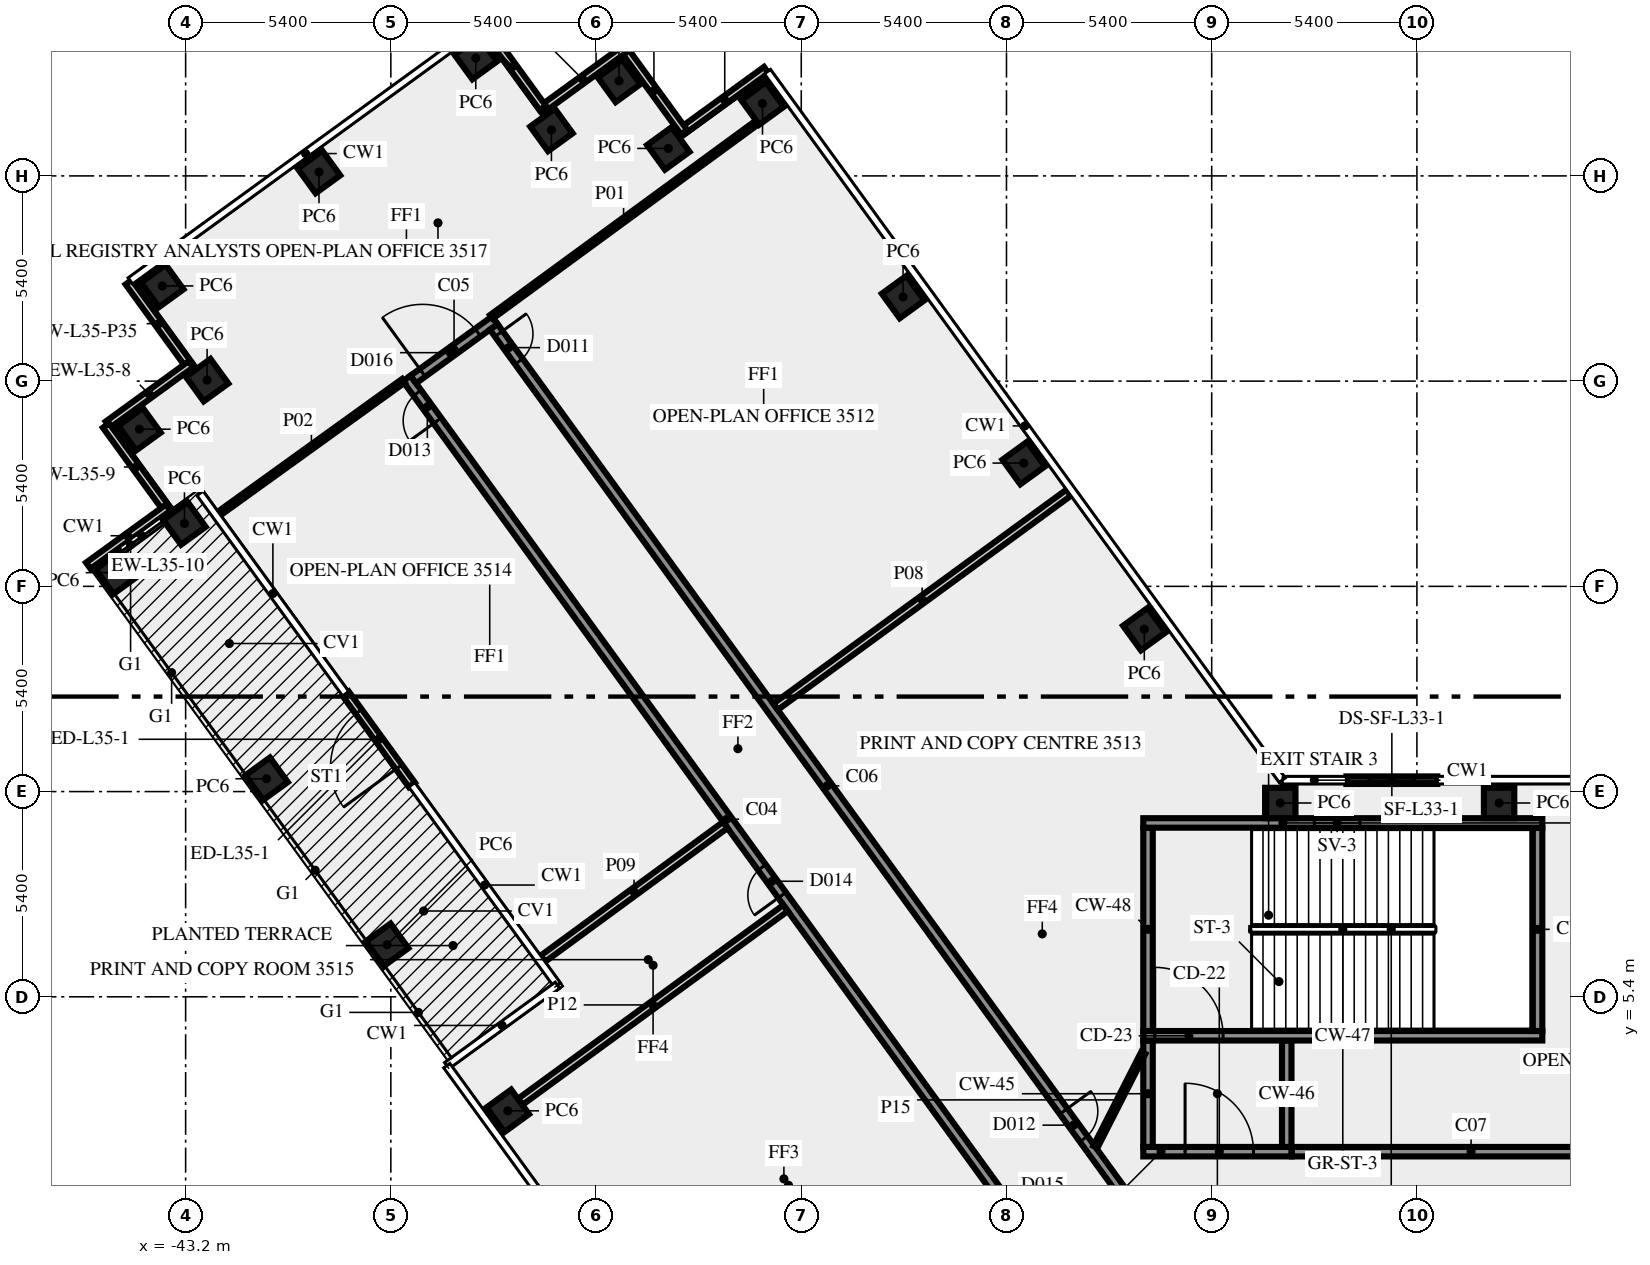
"""IFC4 building model, lengths in metres.
Left out: names, types, materials, properties, quantities, classifications, styles, units other than length and angle.
Written with IfcOpenShell. Run it as: python <this file> out.ifc"""

import sys

from ifc_helpers import new_model, si_unit, direction, frame, frame_2d, origin, origin_2d, place, context, subcontext, project, spatial, rectangle, extrude, element, fill, save


model = new_model("IFC4")
c1 = context("Model", 3, precision=1e-05, world=origin(), true_north=direction((0.0, 1.0)))
c2 = subcontext(c1, "Body", "Model", "MODEL_VIEW")
j1 = project(units=[si_unit("LENGTHUNIT", "METRE"), si_unit("PLANEANGLEUNIT", "RADIAN")], contexts=[c1])
p1 = place(None, origin())
s1 = spatial("IfcSite", under=j1, at=p1, CompositionType="ELEMENT")
p2 = place(p1, origin())
s2 = spatial("IfcBuilding", under=s1, at=p2, CompositionType="ELEMENT")
p3 = place(p2, frame((0.0, 0.0, 152.0)))
s3 = spatial("IfcBuildingStorey", under=s2, at=p3, CompositionType="ELEMENT", Elevation=152.0)
for number, where, z_axis, x_axis in (
    (1, (-17.974, 15.075, 0.0), (0.0, 0.0, 1.0), (-0.588, 0.809, 0.0)),
    (2, (-21.147, 19.444, 0.0), (0.0, 0.0, 1.0), (-0.588, 0.809, 0.0)),
    (3, (-24.321, 23.812, 0.0), (0.0, 0.0, 1.0), (-0.588, 0.809, 0.0)),
    (4, (-28.02, 28.905, 0.0), (0.0, 0.0, 1.0), (-0.809, -0.588, 0.0)),
    (5, (-30.499, 27.723, 0.0), (0.0, 0.0, 1.0), (-0.809, -0.588, 0.0)),
    (6, (-31.795, 29.5, 0.0), (0.0, 0.0, 1.0), (-0.588, 0.809, 0.0)),
    (7, (-33.574, 28.209, 0.0), (0.0, 0.0, 1.0), (-0.588, 0.809, 0.0)),
    (8, (-35.565, 30.1, 0.0), (0.0, 0.0, 1.0), (-0.809, -0.588, 0.0)),
    (9, (-39.691, 27.102, 0.0), (0.0, 0.0, 1.0), (-0.809, -0.588, 0.0)),
    (10, (-43.815, 24.105, 0.0), (0.0, 0.0, 1.0), (-0.809, -0.588, 0.0)),
    (11, (-42.635, 21.626, 0.0), (0.0, 0.0, 1.0), (-0.809, -0.588, 0.0)),
    (12, (-44.415, 20.335, 0.0), (0.0, 0.0, 1.0), (0.588, -0.809, 0.0)),
    (13, (-43.231, 17.854, 0.0), (0.0, 0.0, 1.0), (0.588, -0.809, 0.0)),
    (14, (-45.01, 16.56, 0.0), (0.0, 0.0, 1.0), (0.588, -0.809, 0.0)),
    (15, (-41.07, 11.137, 0.0), (0.0, 0.0, 1.0), (0.588, -0.809, 0.0)),
    (16, (-37.896, 6.769, 0.0), (0.0, 0.0, 1.0), (0.588, -0.809, 0.0)),
    (17, (-34.722, 2.4, 0.0), (0.0, 0.0, 1.0), (0.588, -0.809, 0.0)),
    (18, (-8.637, 10.5, 0.0), (0.0, 0.0, 1.0), (-1.0, 0.0, 0.0)),
    (19, (-14.395, 10.5, 0.0), (0.0, 0.0, 1.0), (-1.0, 0.0, 0.0)),
):
    element("IfcColumn", number, at=place(p3, frame(where, z_axis=z_axis, x_axis=x_axis)), inside=s3, PredefinedType="COLUMN", context=c2, shape_type="SweptSolid", body=[
        extrude(rectangle(XDim=0.8, YDim=0.8, at=origin_2d()), origin(), (0.0, 0.0, 1.0), 3.65),
    ])
p4 = place(p3, frame((-10.263, 11.1, 0.0), z_axis=(0.0, 0.0, 1.0), x_axis=(-1.0, 0.0, 0.0)))
e20 = element("IfcWall", 20, at=p4, inside=s3, PredefinedType="SOLIDWALL", context=c2, shape_type="SweptSolid", body=[
    extrude(rectangle(XDim=2.392, YDim=0.2, at=frame_2d((1.196, 0.0))), origin(), (0.0, 0.0, 1.0), 3.65),
])
p5 = place(p4, frame((0.596, 0.0, 1.0)))
e21 = element("IfcOpeningElement", 21, at=p5, cuts=e20, PredefinedType="OPENING", context=c2, shape_type="SweptSolid", body=[
    extrude(rectangle(XDim=1.2, YDim=1.2, at=frame_2d((0.6, 0.6))), frame((0.0, 0.11, 0.0), z_axis=(0.0, -1.0, 0.0), x_axis=(1.0, 0.0, 0.0)), (0.0, 0.0, 1.0), 0.22),
])
for number, where, z_axis, x_axis in (
    (22, (-27.921, 29.787, 0.0), (0.0, 0.0, 1.0), (-0.809, -0.588, 0.0)),
    (23, (-30.083, 28.149, 0.0), (0.0, 0.0, 1.0), (-0.588, 0.809, 0.0)),
    (24, (-31.654, 30.331, 0.0), (0.0, 0.0, 1.0), (-0.809, -0.588, 0.0)),
    (25, (-33.801, 28.786, 0.0), (0.0, 0.0, 1.0), (-0.588, 0.809, 0.0)),
    (26, (-44.699, 24.205, 0.0), (0.0, 0.0, 1.0), (0.588, -0.809, 0.0)),
):
    element("IfcWall", number, at=place(p3, frame(where, z_axis=z_axis, x_axis=x_axis)), inside=s3, PredefinedType="SOLIDWALL", context=c2, shape_type="SweptSolid", body=[
        extrude(rectangle(XDim=2.7, YDim=0.2, at=frame_2d((1.35, 0.0))), origin(), (0.0, 0.0, 1.0), 3.65),
    ])
p6 = place(p3, frame((-37.246, 10.978, 0.0), z_axis=(0.0, 0.0, 1.0), x_axis=(-0.587735577821, 0.809053082661, 0.0)))
e27 = element("IfcWall", 27, at=p6, inside=s3, PredefinedType="SOLIDWALL", context=c2, shape_type="SweptSolid", body=[
    extrude(rectangle(XDim=2.963, YDim=0.2, at=frame_2d((1.481, 0.0))), origin(), (0.0, 0.0, 1.0), 3.65),
])
p7 = place(p6, frame((0.582, 0.0, 0.0)))
e28 = element("IfcOpeningElement", 28, at=p7, cuts=e27, PredefinedType="OPENING", context=c2, shape_type="SweptSolid", body=[
    extrude(rectangle(XDim=1.8, YDim=2.4, at=frame_2d((0.9, 1.2))), frame((0.0, 0.11, 0.0), z_axis=(0.0, -1.0, 0.0), x_axis=(1.0, 0.0, 0.0)), (0.0, 0.0, 1.0), 0.22),
])
for number, where, z_axis, x_axis in (
    (29, (-43.061, 22.043, 0.0), (0.0, 0.0, 1.0), (-0.809, -0.588, 0.0)),
    (30, (-45.296, 20.434, 0.0), (0.0, 0.0, 1.0), (0.588, -0.809, 0.0)),
):
    element("IfcWall", number, at=place(p3, frame(where, z_axis=z_axis, x_axis=x_axis)), inside=s3, PredefinedType="SOLIDWALL", context=c2, shape_type="SweptSolid", body=[
        extrude(rectangle(XDim=2.7, YDim=0.2, at=frame_2d((1.35, 0.0))), origin(), (0.0, 0.0, 1.0), 3.65),
    ])
p8 = place(p3, frame((-43.658, 18.272, 0.0), z_axis=(0.0, 0.0, 1.0), x_axis=(-0.808979656733, -0.587836639716, 0.0)))
e31 = element("IfcWall", 31, at=p8, inside=s3, PredefinedType="SOLIDWALL", context=c2, shape_type="SweptSolid", body=[
    extrude(rectangle(XDim=2.6, YDim=0.2, at=frame_2d((1.3, 0.0))), origin(), (0.0, 0.0, 1.0), 3.65),
])
p9 = place(p3, frame((-18.0, 1.325, 0.0), z_axis=(0.0, 0.0, 1.0), x_axis=(1.0, 0.0, 0.0)))
e32 = element("IfcWall", 32, at=p9, inside=s3, PredefinedType="SHEAR", context=c2, shape_type="SweptSolid", body=[
    extrude(rectangle(XDim=3.9, YDim=0.25, at=frame_2d((1.95, 0.0))), origin(), (0.0, 0.0, 1.0), 3.65),
])
p10 = place(p9, frame((1.1, 0.0, 0.0)))
e33 = element("IfcOpeningElement", 33, at=p10, cuts=e32, PredefinedType="OPENING", context=c2, shape_type="SweptSolid", body=[
    extrude(rectangle(XDim=1.8, YDim=2.1, at=frame_2d((0.9, 1.05))), frame((0.0, 0.135, 0.0), z_axis=(0.0, -1.0, 0.0), x_axis=(1.0, 0.0, 0.0)), (0.0, 0.0, 1.0), 0.27),
])
for number, where, z_axis, x_axis in (
    (34, (-17.875, 1.45, 0.0), (0.0, 0.0, 1.0), (0.0, 1.0, 0.0)),
    (35, (-14.225, 1.45, 0.0), (0.0, 0.0, 1.0), (0.0, 1.0, 0.0)),
):
    element("IfcWall", number, at=place(p3, frame(where, z_axis=z_axis, x_axis=x_axis)), inside=s3, PredefinedType="SHEAR", context=c2, shape_type="SweptSolid", body=[
        extrude(rectangle(XDim=2.8, YDim=0.25, at=frame_2d((1.4, 0.0))), origin(), (0.0, 0.0, 1.0), 3.65),
    ])
p11 = place(p3, frame((-18.0, 4.375, 0.0), z_axis=(0.0, 0.0, 1.0), x_axis=(1.0, 0.0, 0.0)))
e36 = element("IfcWall", 36, at=p11, inside=s3, PredefinedType="SHEAR", context=c2, shape_type="SweptSolid", body=[
    extrude(rectangle(XDim=10.5, YDim=0.25, at=frame_2d((5.25, 0.0))), origin(), (0.0, 0.0, 1.0), 3.65),
])
p12 = place(p11, frame((0.3, 0.0, 0.0)))
e37 = element("IfcOpeningElement", 37, at=p12, cuts=e36, PredefinedType="OPENING", context=c2, shape_type="SweptSolid", body=[
    extrude(rectangle(XDim=1.8, YDim=2.1, at=frame_2d((0.9, 1.05))), frame((0.0, 0.135, 0.0), z_axis=(0.0, -1.0, 0.0), x_axis=(1.0, 0.0, 0.0)), (0.0, 0.0, 1.0), 0.27),
])
for number, where, z_axis, x_axis in (
    (38, (-17.875, 4.5, 0.0), (0.0, 0.0, 1.0), (0.0, 1.0, 0.0)),
    (39, (-7.625, 4.5, 0.0), (0.0, 0.0, 1.0), (0.0, 1.0, 0.0)),
):
    element("IfcWall", number, at=place(p3, frame(where, z_axis=z_axis, x_axis=x_axis)), inside=s3, PredefinedType="SHEAR", context=c2, shape_type="SweptSolid", body=[
        extrude(rectangle(XDim=5.35, YDim=0.25, at=frame_2d((2.675, 0.0))), origin(), (0.0, 0.0, 1.0), 3.65),
    ])
p13 = place(p3, frame((-18.0, 9.975, 0.0), z_axis=(0.0, 0.0, 1.0), x_axis=(1.0, 0.0, 0.0)))
e40 = element("IfcWall", 40, at=p13, inside=s3, PredefinedType="SHEAR", context=c2, shape_type="SweptSolid", body=[
    extrude(rectangle(XDim=10.5, YDim=0.25, at=frame_2d((5.25, 0.0))), origin(), (0.0, 0.0, 1.0), 3.65),
])
p14 = place(p13, frame((4.5, 0.0, 1.0)))
e41 = element("IfcOpeningElement", 41, at=p14, cuts=e40, PredefinedType="OPENING", context=c2, shape_type="SweptSolid", body=[
    extrude(rectangle(XDim=1.2, YDim=1.2, at=frame_2d((0.6, 0.6))), frame((0.0, 0.135, 0.0), z_axis=(0.0, -1.0, 0.0), x_axis=(1.0, 0.0, 0.0)), (0.0, 0.0, 1.0), 0.27),
])
p15 = place(p3, frame((-20.531, -1.523, 0.0), z_axis=(0.0, 0.0, 1.0), x_axis=(-0.587785812891, 0.809016587076, 0.0)))
e42 = element("IfcWall", 42, at=p15, inside=s3, PredefinedType="SOLIDWALL", context=c2, shape_type="SweptSolid", body=[
    extrude(rectangle(XDim=28.67, YDim=0.25, at=frame_2d((14.335, 0.0))), origin(), (0.0, 0.0, 1.0), 3.65),
])
p16 = place(p15, frame((27.296, 0.0, 0.0)))
e43 = element("IfcOpeningElement", 43, at=p16, cuts=e42, PredefinedType="OPENING", context=c2, shape_type="SweptSolid", body=[
    extrude(rectangle(XDim=0.9, YDim=2.1, at=frame_2d((0.45, 1.05))), frame((0.0, 0.135, 0.0), z_axis=(0.0, -1.0, 0.0), x_axis=(1.0, 0.0, 0.0)), (0.0, 0.0, 1.0), 0.27),
])
p17 = place(p15, frame((11.866, 0.0, 0.0)))
e44 = element("IfcOpeningElement", 44, at=p17, cuts=e42, PredefinedType="OPENING", context=c2, shape_type="SweptSolid", body=[
    extrude(rectangle(XDim=0.9, YDim=2.1, at=frame_2d((0.45, 1.05))), frame((0.0, 0.135, 0.0), z_axis=(0.0, -1.0, 0.0), x_axis=(1.0, 0.0, 0.0)), (0.0, 0.0, 1.0), 0.27),
])
p18 = place(p15, frame((0.533, 0.0, 0.0)))
e45 = element("IfcOpeningElement", 45, at=p18, cuts=e42, PredefinedType="OPENING", context=c2, shape_type="SweptSolid", body=[
    extrude(rectangle(XDim=0.9, YDim=2.1, at=frame_2d((0.45, 1.05))), frame((0.0, 0.135, 0.0), z_axis=(0.0, -1.0, 0.0), x_axis=(1.0, 0.0, 0.0)), (0.0, 0.0, 1.0), 0.27),
])
p19 = place(p3, frame((-37.208, 21.644, 0.0), z_axis=(0.0, 0.0, 1.0), x_axis=(0.809038743598, 0.587755315891, 0.0)))
e46 = element("IfcWall", 46, at=p19, inside=s3, PredefinedType="SOLIDWALL", context=c2, shape_type="SweptSolid", body=[
    extrude(rectangle(XDim=2.65, YDim=0.25, at=frame_2d((1.325, 0.0))), origin(), (0.0, 0.0, 1.0), 3.65),
])
p20 = place(p19, frame((0.3, 0.0, 0.0)))
e47 = element("IfcOpeningElement", 47, at=p20, cuts=e46, PredefinedType="OPENING", context=c2, shape_type="SweptSolid", body=[
    extrude(rectangle(XDim=1.8, YDim=2.1, at=frame_2d((0.9, 1.05))), frame((0.0, 0.135, 0.0), z_axis=(0.0, -1.0, 0.0), x_axis=(1.0, 0.0, 0.0)), (0.0, 0.0, 1.0), 0.27),
])
p21 = place(p3, frame((-35.092, 23.027, 0.0), z_axis=(0.0, 0.0, 1.0), x_axis=(0.587784076945, -0.809017848313, 0.0)))
e48 = element("IfcWall", 48, at=p21, inside=s3, PredefinedType="SOLIDWALL", context=c2, shape_type="SweptSolid", body=[
    extrude(rectangle(XDim=29.853, YDim=0.25, at=frame_2d((14.927, 0.0))), origin(), (0.0, 0.0, 1.0), 3.65),
])
p22 = place(p21, frame((0.224, 0.0, 0.0)))
e49 = element("IfcOpeningElement", 49, at=p22, cuts=e48, PredefinedType="OPENING", context=c2, shape_type="SweptSolid", body=[
    extrude(rectangle(XDim=0.9, YDim=2.1, at=frame_2d((0.45, 1.05))), frame((0.0, 0.135, 0.0), z_axis=(0.0, -1.0, 0.0), x_axis=(1.0, 0.0, 0.0)), (0.0, 0.0, 1.0), 0.27),
])
p23 = place(p21, frame((25.512, 0.0, 0.0)))
e50 = element("IfcOpeningElement", 50, at=p23, cuts=e48, PredefinedType="OPENING", context=c2, shape_type="SweptSolid", body=[
    extrude(rectangle(XDim=0.9, YDim=2.1, at=frame_2d((0.45, 1.05))), frame((0.0, 0.135, 0.0), z_axis=(0.0, -1.0, 0.0), x_axis=(1.0, 0.0, 0.0)), (0.0, 0.0, 1.0), 0.27),
])
p24 = place(p3, frame((-14.09, 1.325, 0.0), z_axis=(0.0, 0.0, 1.0), x_axis=(1.0, 0.0, 0.0)))
e51 = element("IfcWall", 51, at=p24, inside=s3, PredefinedType="SOLIDWALL", context=c2, shape_type="SweptSolid", body=[
    extrude(rectangle(XDim=9.431, YDim=0.25, at=frame_2d((4.716, 0.0))), origin(), (0.0, 0.0, 1.0), 3.65),
])
p25 = place(p24, frame((8.09, 0.0, 0.0)))
e52 = element("IfcOpeningElement", 52, at=p25, cuts=e51, PredefinedType="OPENING", context=c2, shape_type="SweptSolid", body=[
    extrude(rectangle(XDim=0.9, YDim=2.1, at=frame_2d((0.45, 1.05))), frame((0.0, 0.135, 0.0), z_axis=(0.0, -1.0, 0.0), x_axis=(1.0, 0.0, 0.0)), (0.0, 0.0, 1.0), 0.27),
])
p26 = place(p3, frame((-35.154, 23.291, 0.0), z_axis=(0.0, 0.0, 1.0), x_axis=(0.806987196605, 0.590568932908, 0.0)))
e53 = element("IfcWall", 53, at=p26, inside=s3, PredefinedType="PARTITIONING", context=c2, shape_type="SweptSolid", body=[
    extrude(rectangle(XDim=8.62, YDim=0.12, at=frame_2d((4.31, 0.0))), origin(), (0.0, 0.0, 1.0), 3.65),
])
p27 = place(p3, frame((-42.312, 18.12, 0.0), z_axis=(0.0, 0.0, 1.0), x_axis=(0.811422632467, 0.584459845944, 0.0)))
e54 = element("IfcWall", 54, at=p27, inside=s3, PredefinedType="PARTITIONING", context=c2, shape_type="SweptSolid", body=[
    extrude(rectangle(XDim=5.97, YDim=0.12, at=frame_2d((2.985, 0.0))), origin(), (0.0, 0.0, 1.0), 3.65),
])
p28 = place(p3, frame((-27.676, 13.032, 0.0), z_axis=(0.0, 0.0, 1.0), x_axis=(0.807606997933, 0.589721067023, 0.0)))
e55 = element("IfcWall", 55, at=p28, inside=s3, PredefinedType="SOLIDWALL", context=c2, shape_type="SweptSolid", body=[
    extrude(rectangle(XDim=9.55, YDim=0.2, at=frame_2d((4.775, 0.0))), origin(), (0.0, 0.0, 1.0), 2.85),
])
p29 = place(p3, frame((-33.799, 6.403, 0.0), z_axis=(0.0, 0.0, 1.0), x_axis=(0.806598014579, 0.591100366163, 0.0)))
e56 = element("IfcWall", 56, at=p29, inside=s3, PredefinedType="SOLIDWALL", context=c2, shape_type="SweptSolid", body=[
    extrude(rectangle(XDim=5.95, YDim=0.2, at=frame_2d((2.975, 0.0))), origin(), (0.0, 0.0, 1.0), 3.65),
])
p30 = place(p3, frame((-34.395, 2.638, 0.0), z_axis=(0.0, 0.0, 1.0), x_axis=(0.807657534767, 0.589651851973, 0.0)))
e57 = element("IfcWall", 57, at=p30, inside=s3, PredefinedType="SOLIDWALL", context=c2, shape_type="SweptSolid", body=[
    extrude(rectangle(XDim=8.644, YDim=0.2, at=frame_2d((4.322, 0.0))), origin(), (0.0, 0.0, 1.0), 3.65),
])
p31 = place(p3, frame((-19.261, 1.45, 0.0), z_axis=(0.0, 0.0, 1.0), x_axis=(0.453950796792, 0.891026752736, 0.0)))
e58 = element("IfcWall", 58, at=p31, inside=s3, PredefinedType="PARTITIONING", context=c2, shape_type="SweptSolid", body=[
    extrude(rectangle(XDim=2.778, YDim=0.12, at=frame_2d((1.389, 0.0))), origin(), (0.0, 0.0, 1.0), 3.65),
])
p32 = place(p5, origin())
e59 = element("IfcWindow", 59, at=p32, inside=s3, PartitioningType="SINGLE_PANEL", PredefinedType="WINDOW", context=c2, shape_type="SweptSolid", body=[
    extrude(rectangle(XDim=1.2, YDim=1.2, at=frame_2d((0.6, 0.6))), frame((0.0, 0.03, 0.0), z_axis=(0.0, -1.0, 0.0), x_axis=(1.0, 0.0, 0.0)), (0.0, 0.0, 1.0), 0.06),
])
fill(e21, e59)
p33 = place(p7, origin())
e60 = element("IfcDoor", 60, at=p33, inside=s3, OperationType="DOUBLE_DOOR_SINGLE_SWING", PredefinedType="DOOR", context=c2, shape_type="SweptSolid", body=[
    extrude(rectangle(XDim=1.8, YDim=2.4, at=frame_2d((0.9, 1.2))), frame((0.0, 0.025, 0.0), z_axis=(0.0, -1.0, 0.0), x_axis=(1.0, 0.0, 0.0)), (0.0, 0.0, 1.0), 0.05),
])
fill(e28, e60)
p34 = place(p10, origin())
e61 = element("IfcDoor", 61, at=p34, inside=s3, OperationType="DOUBLE_DOOR_SINGLE_SWING", PredefinedType="DOOR", context=c2, shape_type="SweptSolid", body=[
    extrude(rectangle(XDim=1.8, YDim=2.1, at=frame_2d((0.9, 1.05))), frame((0.0, 0.025, 0.0), z_axis=(0.0, -1.0, 0.0), x_axis=(1.0, 0.0, 0.0)), (0.0, 0.0, 1.0), 0.05),
])
fill(e33, e61)
p35 = place(p12, origin())
e62 = element("IfcDoor", 62, at=p35, inside=s3, OperationType="DOUBLE_DOOR_SINGLE_SWING", PredefinedType="DOOR", context=c2, shape_type="SweptSolid", body=[
    extrude(rectangle(XDim=1.8, YDim=2.1, at=frame_2d((0.9, 1.05))), frame((0.0, 0.025, 0.0), z_axis=(0.0, -1.0, 0.0), x_axis=(1.0, 0.0, 0.0)), (0.0, 0.0, 1.0), 0.05),
])
fill(e37, e62)
p36 = place(p14, origin())
e63 = element("IfcWindow", 63, at=p36, inside=s3, PartitioningType="SINGLE_PANEL", PredefinedType="WINDOW", context=c2, shape_type="SweptSolid", body=[
    extrude(rectangle(XDim=1.2, YDim=1.2, at=frame_2d((0.6, 0.6))), frame((0.0, 0.03, 0.0), z_axis=(0.0, -1.0, 0.0), x_axis=(1.0, 0.0, 0.0)), (0.0, 0.0, 1.0), 0.06),
])
fill(e41, e63)
p37 = place(p20, origin())
e64 = element("IfcDoor", 64, at=p37, inside=s3, OperationType="DOUBLE_DOOR_SINGLE_SWING", PredefinedType="DOOR", context=c2, shape_type="SweptSolid", body=[
    extrude(rectangle(XDim=1.8, YDim=2.1, at=frame_2d((0.9, 1.05))), frame((0.0, 0.025, 0.0), z_axis=(0.0, -1.0, 0.0), x_axis=(1.0, 0.0, 0.0)), (0.0, 0.0, 1.0), 0.05),
])
fill(e47, e64)
p38 = place(p22, origin())
e65 = element("IfcDoor", 65, at=p38, inside=s3, OperationType="SINGLE_SWING_LEFT", PredefinedType="DOOR", context=c2, shape_type="SweptSolid", body=[
    extrude(rectangle(XDim=0.9, YDim=2.1, at=frame_2d((0.45, 1.05))), frame((0.0, 0.025, 0.0), z_axis=(0.0, -1.0, 0.0), x_axis=(1.0, 0.0, 0.0)), (0.0, 0.0, 1.0), 0.05),
])
fill(e49, e65)
p39 = place(p16, origin())
e66 = element("IfcDoor", 66, at=p39, inside=s3, OperationType="SINGLE_SWING_RIGHT", PredefinedType="DOOR", context=c2, shape_type="SweptSolid", body=[
    extrude(rectangle(XDim=0.9, YDim=2.1, at=frame_2d((0.45, 1.05))), frame((0.0, 0.025, 0.0), z_axis=(0.0, -1.0, 0.0), x_axis=(1.0, 0.0, 0.0)), (0.0, 0.0, 1.0), 0.05),
])
fill(e43, e66)
p40 = place(p23, origin())
e67 = element("IfcDoor", 67, at=p40, inside=s3, OperationType="SINGLE_SWING_RIGHT", PredefinedType="DOOR", context=c2, shape_type="SweptSolid", body=[
    extrude(rectangle(XDim=0.9, YDim=2.1, at=frame_2d((0.45, 1.05))), frame((0.0, 0.025, 0.0), z_axis=(0.0, -1.0, 0.0), x_axis=(1.0, 0.0, 0.0)), (0.0, 0.0, 1.0), 0.05),
])
fill(e50, e67)
p41 = place(p17, origin())
e68 = element("IfcDoor", 68, at=p41, inside=s3, OperationType="SINGLE_SWING_LEFT", PredefinedType="DOOR", context=c2, shape_type="SweptSolid", body=[
    extrude(rectangle(XDim=0.9, YDim=2.1, at=frame_2d((0.45, 1.05))), frame((0.0, 0.025, 0.0), z_axis=(0.0, -1.0, 0.0), x_axis=(1.0, 0.0, 0.0)), (0.0, 0.0, 1.0), 0.05),
])
fill(e44, e68)
save(model, sys.argv[1])
